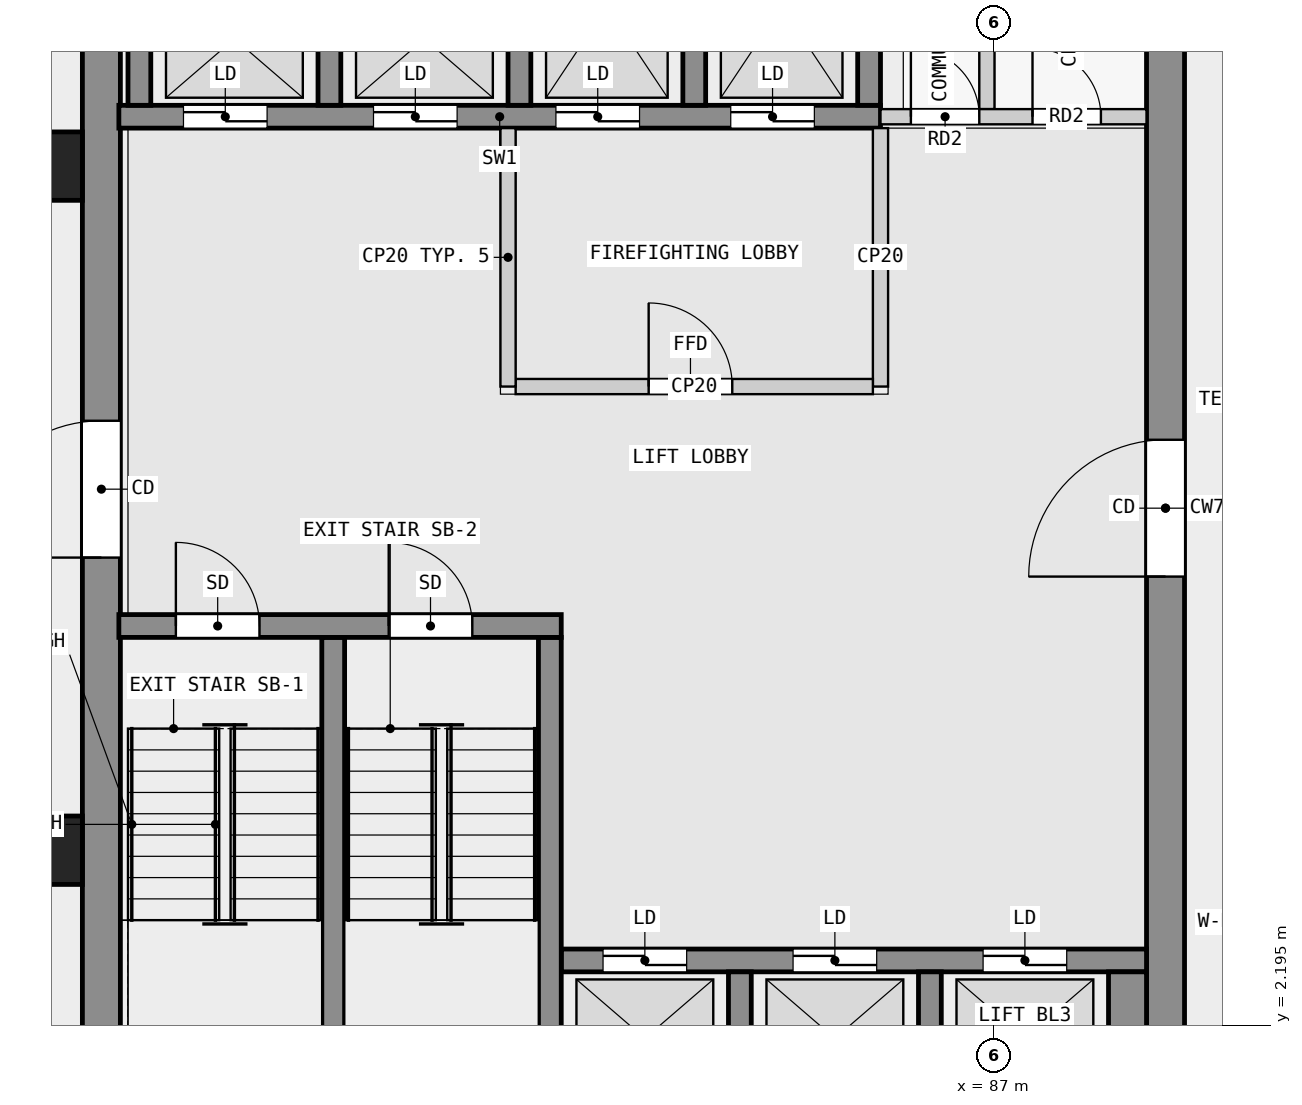
"""IFC4 building model, lengths in metres.
Left out: names, types, materials, properties, quantities, classifications, styles, units other than length and angle.
Written with IfcOpenShell. Run it as: python <this file> out.ifc"""

import sys

from ifc_helpers import new_model, si_unit, direction, frame, frame_2d, origin, origin_2d, place, context, subcontext, project, spatial, rectangle, extrude, element, fill, save


model = new_model("IFC4")
c1 = context("Model", 3, precision=1e-05, world=origin(), true_north=direction((0.0, 1.0)))
c2 = subcontext(c1, "Body", "Model", "MODEL_VIEW")
j1 = project(units=[si_unit("LENGTHUNIT", "METRE"), si_unit("PLANEANGLEUNIT", "RADIAN")], contexts=[c1])
p1 = place(None, origin())
s1 = spatial("IfcSite", under=j1, at=p1, CompositionType="ELEMENT")
p2 = place(p1, origin())
s2 = spatial("IfcBuilding", under=s1, at=p2, CompositionType="ELEMENT")
p3 = place(p2, frame((0.0, 0.0, 40.8)))
s3 = spatial("IfcBuildingStorey", under=s2, at=p3, CompositionType="ELEMENT", Elevation=40.8)
for number, where, z_axis, x_axis in (
    (1, (74.55, 13.5, 0.0), (0.0, 0.0, 1.0), (1.0, 0.0, 0.0)),
    (2, (74.55, 4.5, 0.0), (0.0, 0.0, 1.0), (1.0, 0.0, 0.0)),
):
    element("IfcColumn", number, at=place(p3, frame(where, z_axis=z_axis, x_axis=x_axis)), inside=s3, PredefinedType="COLUMN", context=c2, shape_type="SweptSolid", body=[
        extrude(rectangle(XDim=0.9, YDim=0.9, at=origin_2d()), origin(), (0.0, 0.0, 1.0), 3.5),
    ])
p4 = place(p3, frame((75.25, 0.5, 0.0), z_axis=(0.0, 0.0, 1.0), x_axis=(0.0, 1.0, 0.0)))
e3 = element("IfcWall", 3, at=p4, inside=s3, PredefinedType="SHEAR", context=c2, shape_type="SweptSolid", body=[
    extrude(rectangle(XDim=17.0, YDim=0.5, at=frame_2d((8.5, 0.0))), origin(), (0.0, 0.0, 1.0), 3.25),
])
p5 = place(p4, frame((7.85, 0.0, 0.0)))
e4 = element("IfcOpeningElement", 4, at=p5, cuts=e3, PredefinedType="OPENING", context=c2, shape_type="SweptSolid", body=[
    extrude(rectangle(XDim=1.8, YDim=2.1, at=frame_2d((0.9, 1.05))), frame((0.0, 0.26, 0.0), z_axis=(0.0, -1.0, 0.0), x_axis=(1.0, 0.0, 0.0)), (0.0, 0.0, 1.0), 0.52),
])
p6 = place(p3, frame((89.25, 0.5, 0.0), z_axis=(0.0, 0.0, 1.0), x_axis=(0.0, 1.0, 0.0)))
e5 = element("IfcWall", 5, at=p6, inside=s3, PredefinedType="SHEAR", context=c2, shape_type="SweptSolid", body=[
    extrude(rectangle(XDim=17.0, YDim=0.5, at=frame_2d((8.5, 0.0))), origin(), (0.0, 0.0, 1.0), 3.25),
])
p7 = place(p6, frame((7.6, 0.0, 0.0)))
e6 = element("IfcOpeningElement", 6, at=p7, cuts=e5, PredefinedType="OPENING", context=c2, shape_type="SweptSolid", body=[
    extrude(rectangle(XDim=1.8, YDim=2.1, at=frame_2d((0.9, 1.05))), frame((0.0, 0.26, 0.0), z_axis=(0.0, -1.0, 0.0), x_axis=(1.0, 0.0, 0.0)), (0.0, 0.0, 1.0), 0.52),
])
p8 = place(p3, frame((75.48, 7.45, 0.0), z_axis=(0.0, 0.0, 1.0), x_axis=(1.0, 0.0, 0.0)))
e7 = element("IfcWall", 7, at=p8, inside=s3, PredefinedType="SHEAR", context=c2, shape_type="SweptSolid", body=[
    extrude(rectangle(XDim=5.82, YDim=0.3, at=frame_2d((2.91, 0.0))), origin(), (0.0, 0.0, 1.0), 3.25),
])
p9 = place(p8, frame((0.75, 0.0, 0.0)))
e8 = element("IfcOpeningElement", 8, at=p9, cuts=e7, PredefinedType="OPENING", context=c2, shape_type="SweptSolid", body=[
    extrude(rectangle(XDim=1.1, YDim=2.1, at=frame_2d((0.55, 1.05))), frame((0.0, 0.16, 0.0), z_axis=(0.0, -1.0, 0.0), x_axis=(1.0, 0.0, 0.0)), (0.0, 0.0, 1.0), 0.32),
])
p10 = place(p8, frame((3.55, 0.0, 0.0)))
e9 = element("IfcOpeningElement", 9, at=p10, cuts=e7, PredefinedType="OPENING", context=c2, shape_type="SweptSolid", body=[
    extrude(rectangle(XDim=1.1, YDim=2.1, at=frame_2d((0.55, 1.05))), frame((0.0, 0.16, 0.0), z_axis=(0.0, -1.0, 0.0), x_axis=(1.0, 0.0, 0.0)), (0.0, 0.0, 1.0), 0.32),
])
for number, where, z_axis, x_axis in (
    (10, (78.3, 0.9, 0.0), (0.0, 0.0, 1.0), (0.0, 1.0, 0.0)),
    (11, (81.15, 0.9, 0.0), (0.0, 0.0, 1.0), (0.0, 1.0, 0.0)),
):
    element("IfcWall", number, at=place(p3, frame(where, z_axis=z_axis, x_axis=x_axis)), inside=s3, PredefinedType="SHEAR", context=c2, shape_type="SweptSolid", body=[
        extrude(rectangle(XDim=6.4, YDim=0.3, at=frame_2d((3.2, 0.0))), origin(), (0.0, 0.0, 1.0), 3.25),
    ])
for number, where, z_axis, x_axis in (
    (12, (83.65, 0.9, 0.0), (0.0, 0.0, 1.0), (0.0, 1.0, 0.0)),
    (13, (86.15, 0.9, 0.0), (0.0, 0.0, 1.0), (0.0, 1.0, 0.0)),
):
    element("IfcWall", number, at=place(p3, frame(where, z_axis=z_axis, x_axis=x_axis)), inside=s3, PredefinedType="SHEAR", context=c2, shape_type="SweptSolid", body=[
        extrude(rectangle(XDim=2.0, YDim=0.3, at=frame_2d((1.0, 0.0))), origin(), (0.0, 0.0, 1.0), 3.25),
    ])
p11 = place(p3, frame((88.75, 0.9, 0.0), z_axis=(0.0, 0.0, 1.0), x_axis=(0.0, 1.0, 0.0)))
e14 = element("IfcWall", 14, at=p11, inside=s3, PredefinedType="SHEAR", context=c2, shape_type="SweptSolid", body=[
    extrude(rectangle(XDim=2.0, YDim=0.5, at=frame_2d((1.0, 0.0))), origin(), (0.0, 0.0, 1.0), 3.25),
])
p12 = place(p3, frame((81.3, 3.05, 0.0), z_axis=(0.0, 0.0, 1.0), x_axis=(1.0, 0.0, 0.0)))
e15 = element("IfcWall", 15, at=p12, inside=s3, PredefinedType="SHEAR", context=c2, shape_type="SweptSolid", body=[
    extrude(rectangle(XDim=7.7, YDim=0.3, at=frame_2d((3.85, 0.0))), origin(), (0.0, 0.0, 1.0), 3.25),
])
p13 = place(p12, frame((0.55, 0.0, 0.0)))
e16 = element("IfcOpeningElement", 16, at=p13, cuts=e15, PredefinedType="OPENING", context=c2, shape_type="SweptSolid", body=[
    extrude(rectangle(XDim=1.1, YDim=2.1, at=frame_2d((0.55, 1.05))), frame((0.0, 0.16, 0.0), z_axis=(0.0, -1.0, 0.0), x_axis=(1.0, 0.0, 0.0)), (0.0, 0.0, 1.0), 0.32),
])
p14 = place(p12, frame((3.05, 0.0, 0.0)))
e17 = element("IfcOpeningElement", 17, at=p14, cuts=e15, PredefinedType="OPENING", context=c2, shape_type="SweptSolid", body=[
    extrude(rectangle(XDim=1.1, YDim=2.1, at=frame_2d((0.55, 1.05))), frame((0.0, 0.16, 0.0), z_axis=(0.0, -1.0, 0.0), x_axis=(1.0, 0.0, 0.0)), (0.0, 0.0, 1.0), 0.32),
])
p15 = place(p12, frame((5.55, 0.0, 0.0)))
e18 = element("IfcOpeningElement", 18, at=p15, cuts=e15, PredefinedType="OPENING", context=c2, shape_type="SweptSolid", body=[
    extrude(rectangle(XDim=1.1, YDim=2.1, at=frame_2d((0.55, 1.05))), frame((0.0, 0.16, 0.0), z_axis=(0.0, -1.0, 0.0), x_axis=(1.0, 0.0, 0.0)), (0.0, 0.0, 1.0), 0.32),
])
p16 = place(p3, frame((75.48, 14.15, 0.0), z_axis=(0.0, 0.0, 1.0), x_axis=(1.0, 0.0, 0.0)))
e19 = element("IfcWall", 19, at=p16, inside=s3, PredefinedType="SHEAR", context=c2, shape_type="SweptSolid", body=[
    extrude(rectangle(XDim=10.02, YDim=0.3, at=frame_2d((5.01, 0.0))), origin(), (0.0, 0.0, 1.0), 3.25),
])
p17 = place(p16, frame((0.85, 0.0, 0.0)))
e20 = element("IfcOpeningElement", 20, at=p17, cuts=e19, PredefinedType="OPENING", context=c2, shape_type="SweptSolid", body=[
    extrude(rectangle(XDim=1.1, YDim=2.1, at=frame_2d((0.55, 1.05))), frame((0.0, 0.16, 0.0), z_axis=(0.0, -1.0, 0.0), x_axis=(1.0, 0.0, 0.0)), (0.0, 0.0, 1.0), 0.32),
])
p18 = place(p16, frame((3.35, 0.0, 0.0)))
e21 = element("IfcOpeningElement", 21, at=p18, cuts=e19, PredefinedType="OPENING", context=c2, shape_type="SweptSolid", body=[
    extrude(rectangle(XDim=1.1, YDim=2.1, at=frame_2d((0.55, 1.05))), frame((0.0, 0.16, 0.0), z_axis=(0.0, -1.0, 0.0), x_axis=(1.0, 0.0, 0.0)), (0.0, 0.0, 1.0), 0.32),
])
p19 = place(p16, frame((5.75, 0.0, 0.0)))
e22 = element("IfcOpeningElement", 22, at=p19, cuts=e19, PredefinedType="OPENING", context=c2, shape_type="SweptSolid", body=[
    extrude(rectangle(XDim=1.1, YDim=2.1, at=frame_2d((0.55, 1.05))), frame((0.0, 0.16, 0.0), z_axis=(0.0, -1.0, 0.0), x_axis=(1.0, 0.0, 0.0)), (0.0, 0.0, 1.0), 0.32),
])
p20 = place(p16, frame((8.05, 0.0, 0.0)))
e23 = element("IfcOpeningElement", 23, at=p20, cuts=e19, PredefinedType="OPENING", context=c2, shape_type="SweptSolid", body=[
    extrude(rectangle(XDim=1.1, YDim=2.1, at=frame_2d((0.55, 1.05))), frame((0.0, 0.16, 0.0), z_axis=(0.0, -1.0, 0.0), x_axis=(1.0, 0.0, 0.0)), (0.0, 0.0, 1.0), 0.32),
])
for number, where, z_axis, x_axis in (
    (24, (75.75, 14.3, 0.0), (0.0, 0.0, 1.0), (0.0, 1.0, 0.0)),
    (25, (78.25, 14.3, 0.0), (0.0, 0.0, 1.0), (0.0, 1.0, 0.0)),
    (26, (80.75, 14.3, 0.0), (0.0, 0.0, 1.0), (0.0, 1.0, 0.0)),
    (27, (83.05, 14.3, 0.0), (0.0, 0.0, 1.0), (0.0, 1.0, 0.0)),
    (28, (85.35, 14.3, 0.0), (0.0, 0.0, 1.0), (0.0, 1.0, 0.0)),
):
    element("IfcWall", number, at=place(p3, frame(where, z_axis=z_axis, x_axis=x_axis)), inside=s3, PredefinedType="SHEAR", context=c2, shape_type="SweptSolid", body=[
        extrude(rectangle(XDim=2.8, YDim=0.3, at=frame_2d((1.4, 0.0))), origin(), (0.0, 0.0, 1.0), 3.25),
    ])
p21 = place(p3, frame((80.6, 10.6, 0.0), z_axis=(0.0, 0.0, 1.0), x_axis=(0.0, 1.0, 0.0)))
e29 = element("IfcWall", 29, at=p21, inside=s3, PredefinedType="PARTITIONING", context=c2, shape_type="SweptSolid", body=[
    extrude(rectangle(XDim=3.4, YDim=0.2, at=frame_2d((1.7, 0.0))), origin(), (0.0, 0.0, 1.0), 3.25),
])
p22 = place(p3, frame((80.7, 10.6, 0.0), z_axis=(0.0, 0.0, 1.0), x_axis=(1.0, 0.0, 0.0)))
e30 = element("IfcWall", 30, at=p22, inside=s3, PredefinedType="PARTITIONING", context=c2, shape_type="SweptSolid", body=[
    extrude(rectangle(XDim=4.7, YDim=0.2, at=frame_2d((2.35, 0.0))), origin(), (0.0, 0.0, 1.0), 3.25),
])
p23 = place(p22, frame((1.75, 0.0, 0.0)))
e31 = element("IfcOpeningElement", 31, at=p23, cuts=e30, PredefinedType="OPENING", context=c2, shape_type="SweptSolid", body=[
    extrude(rectangle(XDim=1.1, YDim=2.1, at=frame_2d((0.55, 1.05))), frame((0.0, 0.11, 0.0), z_axis=(0.0, -1.0, 0.0), x_axis=(1.0, 0.0, 0.0)), (0.0, 0.0, 1.0), 0.22),
])
p24 = place(p3, frame((85.5, 10.6, 0.0), z_axis=(0.0, 0.0, 1.0), x_axis=(0.0, 1.0, 0.0)))
e32 = element("IfcWall", 32, at=p24, inside=s3, PredefinedType="PARTITIONING", context=c2, shape_type="SweptSolid", body=[
    extrude(rectangle(XDim=3.4, YDim=0.2, at=frame_2d((1.7, 0.0))), origin(), (0.0, 0.0, 1.0), 3.25),
])
p25 = place(p3, frame((85.5, 14.15, 0.0), z_axis=(0.0, 0.0, 1.0), x_axis=(1.0, 0.0, 0.0)))
e33 = element("IfcWall", 33, at=p25, inside=s3, PredefinedType="PARTITIONING", context=c2, shape_type="SweptSolid", body=[
    extrude(rectangle(XDim=3.5, YDim=0.2, at=frame_2d((1.75, 0.0))), origin(), (0.0, 0.0, 1.0), 3.25),
])
p26 = place(p25, frame((0.4, 0.0, 0.0)))
e34 = element("IfcOpeningElement", 34, at=p26, cuts=e33, PredefinedType="OPENING", context=c2, shape_type="SweptSolid", body=[
    extrude(rectangle(XDim=0.9, YDim=2.1, at=frame_2d((0.45, 1.05))), frame((0.0, 0.11, 0.0), z_axis=(0.0, -1.0, 0.0), x_axis=(1.0, 0.0, 0.0)), (0.0, 0.0, 1.0), 0.22),
])
p27 = place(p25, frame((2.0, 0.0, 0.0)))
e35 = element("IfcOpeningElement", 35, at=p27, cuts=e33, PredefinedType="OPENING", context=c2, shape_type="SweptSolid", body=[
    extrude(rectangle(XDim=0.9, YDim=2.1, at=frame_2d((0.45, 1.05))), frame((0.0, 0.11, 0.0), z_axis=(0.0, -1.0, 0.0), x_axis=(1.0, 0.0, 0.0)), (0.0, 0.0, 1.0), 0.22),
])
p28 = place(p3, frame((86.9, 14.25, 0.0), z_axis=(0.0, 0.0, 1.0), x_axis=(0.0, 1.0, 0.0)))
e36 = element("IfcWall", 36, at=p28, inside=s3, PredefinedType="PARTITIONING", context=c2, shape_type="SweptSolid", body=[
    extrude(rectangle(XDim=3.25, YDim=0.2, at=frame_2d((1.625, 0.0))), origin(), (0.0, 0.0, 1.0), 3.25),
])
p29 = place(p23, origin())
e37 = element("IfcDoor", 37, at=p29, inside=s3, OperationType="SINGLE_SWING_LEFT", PredefinedType="DOOR", context=c2, shape_type="SweptSolid", body=[
    extrude(rectangle(XDim=1.1, YDim=2.1, at=frame_2d((0.55, 1.05))), frame((0.0, 0.025, 0.0), z_axis=(0.0, -1.0, 0.0), x_axis=(1.0, 0.0, 0.0)), (0.0, 0.0, 1.0), 0.05),
])
fill(e31, e37)
p30 = place(p13, origin())
e38 = element("IfcDoor", 38, at=p30, inside=s3, OperationType="DOUBLE_DOOR_SLIDING", PredefinedType="DOOR", context=c2, shape_type="SweptSolid", body=[
    extrude(rectangle(XDim=1.1, YDim=2.1, at=frame_2d((0.55, 1.05))), frame((0.0, 0.025, 0.0), z_axis=(0.0, -1.0, 0.0), x_axis=(1.0, 0.0, 0.0)), (0.0, 0.0, 1.0), 0.05),
])
fill(e16, e38)
p31 = place(p14, origin())
e39 = element("IfcDoor", 39, at=p31, inside=s3, OperationType="DOUBLE_DOOR_SLIDING", PredefinedType="DOOR", context=c2, shape_type="SweptSolid", body=[
    extrude(rectangle(XDim=1.1, YDim=2.1, at=frame_2d((0.55, 1.05))), frame((0.0, 0.025, 0.0), z_axis=(0.0, -1.0, 0.0), x_axis=(1.0, 0.0, 0.0)), (0.0, 0.0, 1.0), 0.05),
])
fill(e17, e39)
p32 = place(p15, origin())
e40 = element("IfcDoor", 40, at=p32, inside=s3, OperationType="DOUBLE_DOOR_SLIDING", PredefinedType="DOOR", context=c2, shape_type="SweptSolid", body=[
    extrude(rectangle(XDim=1.1, YDim=2.1, at=frame_2d((0.55, 1.05))), frame((0.0, 0.025, 0.0), z_axis=(0.0, -1.0, 0.0), x_axis=(1.0, 0.0, 0.0)), (0.0, 0.0, 1.0), 0.05),
])
fill(e18, e40)
p33 = place(p17, origin())
e41 = element("IfcDoor", 41, at=p33, inside=s3, OperationType="DOUBLE_DOOR_SLIDING", PredefinedType="DOOR", context=c2, shape_type="SweptSolid", body=[
    extrude(rectangle(XDim=1.1, YDim=2.1, at=frame_2d((0.55, 1.05))), frame((0.0, 0.025, 0.0), z_axis=(0.0, -1.0, 0.0), x_axis=(1.0, 0.0, 0.0)), (0.0, 0.0, 1.0), 0.05),
])
fill(e20, e41)
p34 = place(p18, origin())
e42 = element("IfcDoor", 42, at=p34, inside=s3, OperationType="DOUBLE_DOOR_SLIDING", PredefinedType="DOOR", context=c2, shape_type="SweptSolid", body=[
    extrude(rectangle(XDim=1.1, YDim=2.1, at=frame_2d((0.55, 1.05))), frame((0.0, 0.025, 0.0), z_axis=(0.0, -1.0, 0.0), x_axis=(1.0, 0.0, 0.0)), (0.0, 0.0, 1.0), 0.05),
])
fill(e21, e42)
p35 = place(p19, origin())
e43 = element("IfcDoor", 43, at=p35, inside=s3, OperationType="DOUBLE_DOOR_SLIDING", PredefinedType="DOOR", context=c2, shape_type="SweptSolid", body=[
    extrude(rectangle(XDim=1.1, YDim=2.1, at=frame_2d((0.55, 1.05))), frame((0.0, 0.025, 0.0), z_axis=(0.0, -1.0, 0.0), x_axis=(1.0, 0.0, 0.0)), (0.0, 0.0, 1.0), 0.05),
])
fill(e22, e43)
p36 = place(p20, origin())
e44 = element("IfcDoor", 44, at=p36, inside=s3, OperationType="DOUBLE_DOOR_SLIDING", PredefinedType="DOOR", context=c2, shape_type="SweptSolid", body=[
    extrude(rectangle(XDim=1.1, YDim=2.1, at=frame_2d((0.55, 1.05))), frame((0.0, 0.025, 0.0), z_axis=(0.0, -1.0, 0.0), x_axis=(1.0, 0.0, 0.0)), (0.0, 0.0, 1.0), 0.05),
])
fill(e23, e44)
p37 = place(p9, origin())
e45 = element("IfcDoor", 45, at=p37, inside=s3, OperationType="SINGLE_SWING_RIGHT", PredefinedType="DOOR", context=c2, shape_type="SweptSolid", body=[
    extrude(rectangle(XDim=1.1, YDim=2.1, at=frame_2d((0.55, 1.05))), frame((0.0, 0.025, 0.0), z_axis=(0.0, -1.0, 0.0), x_axis=(1.0, 0.0, 0.0)), (0.0, 0.0, 1.0), 0.05),
])
fill(e8, e45)
p38 = place(p10, origin())
e46 = element("IfcDoor", 46, at=p38, inside=s3, OperationType="SINGLE_SWING_LEFT", PredefinedType="DOOR", context=c2, shape_type="SweptSolid", body=[
    extrude(rectangle(XDim=1.1, YDim=2.1, at=frame_2d((0.55, 1.05))), frame((0.0, 0.025, 0.0), z_axis=(0.0, -1.0, 0.0), x_axis=(1.0, 0.0, 0.0)), (0.0, 0.0, 1.0), 0.05),
])
fill(e9, e46)
p39 = place(p5, origin())
e47 = element("IfcDoor", 47, at=p39, inside=s3, OperationType="DOUBLE_DOOR_SINGLE_SWING", PredefinedType="DOOR", context=c2, shape_type="SweptSolid", body=[
    extrude(rectangle(XDim=1.8, YDim=2.1, at=frame_2d((0.9, 1.05))), frame((0.0, 0.025, 0.0), z_axis=(0.0, -1.0, 0.0), x_axis=(1.0, 0.0, 0.0)), (0.0, 0.0, 1.0), 0.05),
])
fill(e4, e47)
p40 = place(p7, origin())
e48 = element("IfcDoor", 48, at=p40, inside=s3, OperationType="DOUBLE_DOOR_SINGLE_SWING", PredefinedType="DOOR", context=c2, shape_type="SweptSolid", body=[
    extrude(rectangle(XDim=1.8, YDim=2.1, at=frame_2d((0.9, 1.05))), frame((0.0, 0.025, 0.0), z_axis=(0.0, -1.0, 0.0), x_axis=(1.0, 0.0, 0.0)), (0.0, 0.0, 1.0), 0.05),
])
fill(e6, e48)
p41 = place(p26, origin())
e49 = element("IfcDoor", 49, at=p41, inside=s3, OperationType="SINGLE_SWING_LEFT", PredefinedType="DOOR", context=c2, shape_type="SweptSolid", body=[
    extrude(rectangle(XDim=0.9, YDim=2.1, at=frame_2d((0.45, 1.05))), frame((0.0, 0.025, 0.0), z_axis=(0.0, -1.0, 0.0), x_axis=(1.0, 0.0, 0.0)), (0.0, 0.0, 1.0), 0.05),
])
fill(e34, e49)
p42 = place(p27, origin())
e50 = element("IfcDoor", 50, at=p42, inside=s3, OperationType="SINGLE_SWING_LEFT", PredefinedType="DOOR", context=c2, shape_type="SweptSolid", body=[
    extrude(rectangle(XDim=0.9, YDim=2.1, at=frame_2d((0.45, 1.05))), frame((0.0, 0.025, 0.0), z_axis=(0.0, -1.0, 0.0), x_axis=(1.0, 0.0, 0.0)), (0.0, 0.0, 1.0), 0.05),
])
fill(e35, e50)
save(model, sys.argv[1])
